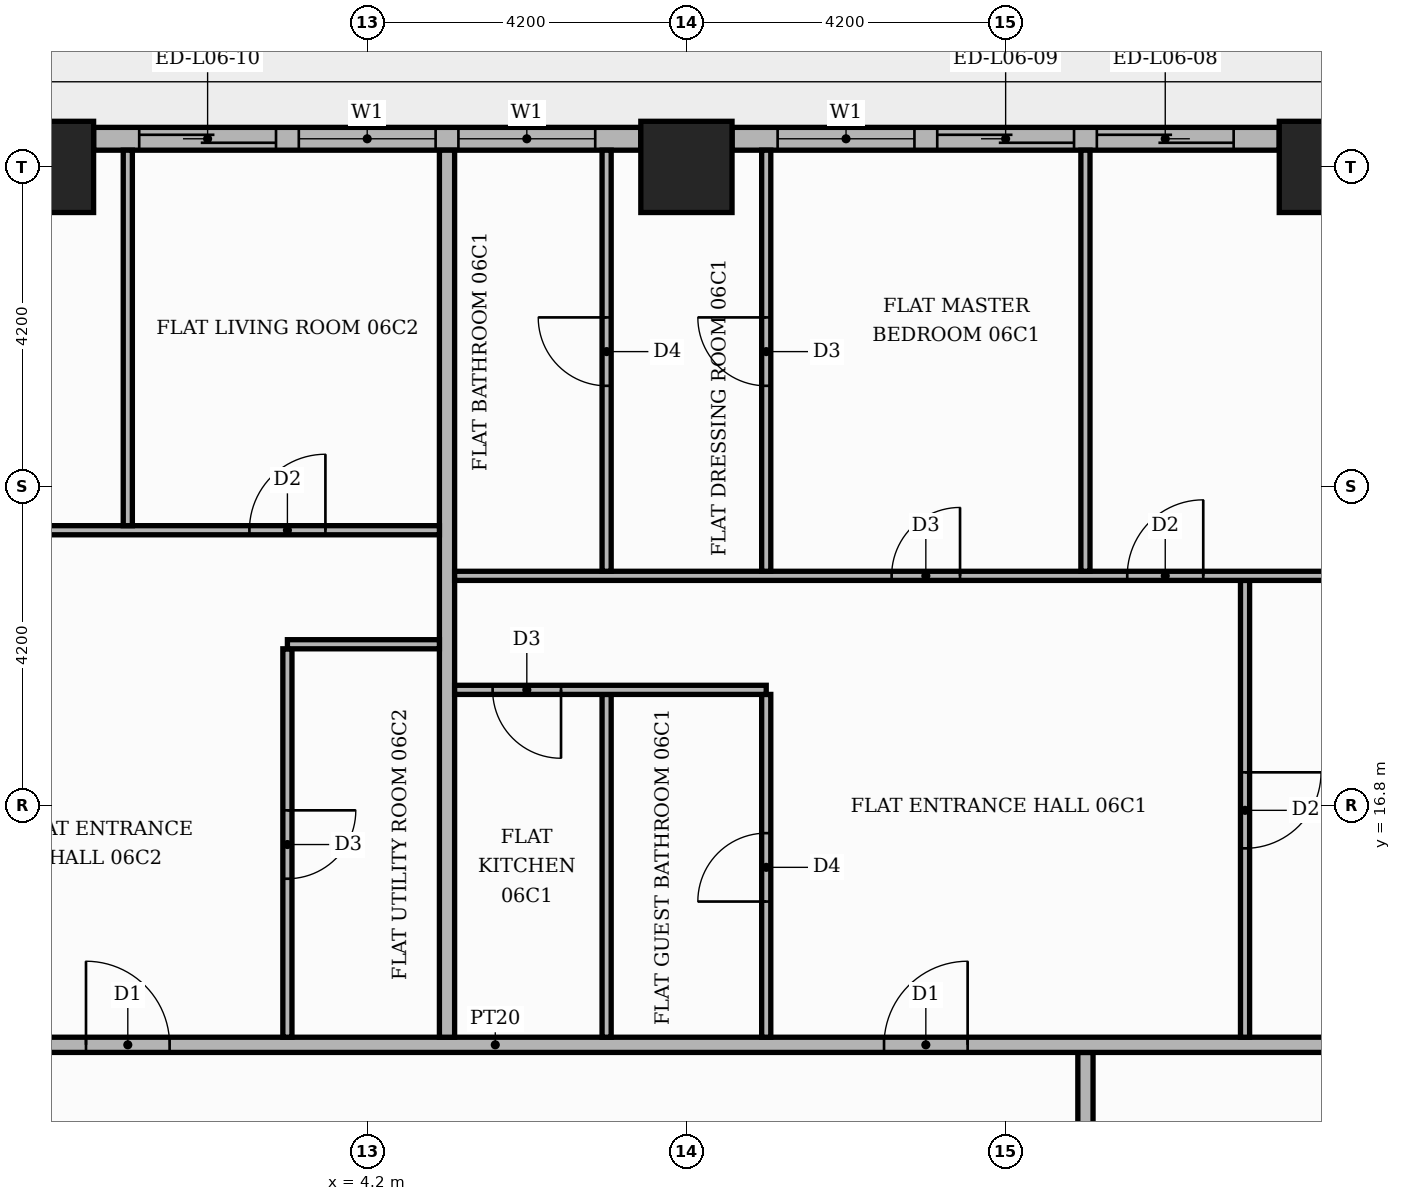
"""IFC4 building model, lengths in metres.
Left out: names, types, materials, properties, quantities, classifications, styles, units other than length and angle.
Written with IfcOpenShell. Run it as: python <this file> out.ifc"""

import sys

from ifc_helpers import new_model, si_unit, direction, frame, frame_2d, origin, origin_2d, place, context, subcontext, project, spatial, rectangle, extrude, element, fill, save


model = new_model("IFC4")
c1 = context("Model", 3, precision=1e-05, world=origin(), true_north=direction((0.0, 1.0)))
c2 = subcontext(c1, "Body", "Model", "MODEL_VIEW")
j1 = project(units=[si_unit("LENGTHUNIT", "METRE"), si_unit("PLANEANGLEUNIT", "RADIAN")], contexts=[c1])
p1 = place(None, origin())
s1 = spatial("IfcSite", under=j1, at=p1, CompositionType="ELEMENT")
p2 = place(p1, origin())
s2 = spatial("IfcBuilding", under=s1, at=p2, CompositionType="ELEMENT")
p3 = place(p2, frame((0.0, 0.0, 30.9)))
s3 = spatial("IfcBuildingStorey", under=s2, at=p3, CompositionType="ELEMENT", Elevation=30.9)
for number, where, z_axis, x_axis in (
    (1, (0.0, 25.2, 0.0), (0.0, 0.0, 1.0), (1.0, 0.0, 0.0)),
    (2, (8.4, 25.2, 0.0), (0.0, 0.0, 1.0), (1.0, 0.0, 0.0)),
    (3, (16.8, 25.2, 0.0), (0.0, 0.0, 1.0), (1.0, 0.0, 0.0)),
):
    element("IfcColumn", number, at=place(p3, frame(where, z_axis=z_axis, x_axis=x_axis)), inside=s3, PredefinedType="COLUMN", context=c2, shape_type="SweptSolid", body=[
        extrude(rectangle(XDim=1.2, YDim=1.2, at=origin_2d()), origin(), (0.0, 0.0, 1.0), 3.9),
    ])
p4 = place(p3, frame((16.2, 25.57, 0.0), z_axis=(0.0, 0.0, 1.0), x_axis=(-1.0, 0.0, 0.0)))
e4 = element("IfcWall", 4, at=p4, inside=s3, PredefinedType="STANDARD", context=c2, shape_type="SweptSolid", body=[
    extrude(rectangle(XDim=7.2, YDim=0.3, at=frame_2d((3.6, 0.0))), origin(), (0.0, 0.0, 1.0), 3.48),
])
p5 = place(p4, frame((0.6, 0.0, 0.0)))
e5 = element("IfcOpeningElement", 5, at=p5, cuts=e4, PredefinedType="OPENING", context=c2, shape_type="SweptSolid", body=[
    extrude(rectangle(XDim=1.8, YDim=2.4, at=frame_2d((0.9, 1.2))), frame((0.0, 0.16, 0.0), z_axis=(0.0, -1.0, 0.0), x_axis=(1.0, 0.0, 0.0)), (0.0, 0.0, 1.0), 0.32),
])
p6 = place(p4, frame((2.7, 0.0, 0.0)))
e6 = element("IfcOpeningElement", 6, at=p6, cuts=e4, PredefinedType="OPENING", context=c2, shape_type="SweptSolid", body=[
    extrude(rectangle(XDim=1.8, YDim=2.4, at=frame_2d((0.9, 1.2))), frame((0.0, 0.16, 0.0), z_axis=(0.0, -1.0, 0.0), x_axis=(1.0, 0.0, 0.0)), (0.0, 0.0, 1.0), 0.32),
])
p7 = place(p4, frame((4.8, 0.0, 0.9)))
e7 = element("IfcOpeningElement", 7, at=p7, cuts=e4, PredefinedType="OPENING", context=c2, shape_type="SweptSolid", body=[
    extrude(rectangle(XDim=1.8, YDim=2.1, at=frame_2d((0.9, 1.05))), frame((0.0, 0.16, 0.0), z_axis=(0.0, -1.0, 0.0), x_axis=(1.0, 0.0, 0.0)), (0.0, 0.0, 1.0), 0.32),
])
p8 = place(p3, frame((7.8, 25.57, 0.0), z_axis=(0.0, 0.0, 1.0), x_axis=(-1.0, 0.0, 0.0)))
e8 = element("IfcWall", 8, at=p8, inside=s3, PredefinedType="STANDARD", context=c2, shape_type="SweptSolid", body=[
    extrude(rectangle(XDim=7.2, YDim=0.3, at=frame_2d((3.6, 0.0))), origin(), (0.0, 0.0, 1.0), 3.48),
])
p9 = place(p8, frame((0.6, 0.0, 0.9)))
e9 = element("IfcOpeningElement", 9, at=p9, cuts=e8, PredefinedType="OPENING", context=c2, shape_type="SweptSolid", body=[
    extrude(rectangle(XDim=1.8, YDim=2.1, at=frame_2d((0.9, 1.05))), frame((0.0, 0.16, 0.0), z_axis=(0.0, -1.0, 0.0), x_axis=(1.0, 0.0, 0.0)), (0.0, 0.0, 1.0), 0.32),
])
p10 = place(p8, frame((2.7, 0.0, 0.9)))
e10 = element("IfcOpeningElement", 10, at=p10, cuts=e8, PredefinedType="OPENING", context=c2, shape_type="SweptSolid", body=[
    extrude(rectangle(XDim=1.8, YDim=2.1, at=frame_2d((0.9, 1.05))), frame((0.0, 0.16, 0.0), z_axis=(0.0, -1.0, 0.0), x_axis=(1.0, 0.0, 0.0)), (0.0, 0.0, 1.0), 0.32),
])
p11 = place(p8, frame((4.8, 0.0, 0.0)))
e11 = element("IfcOpeningElement", 11, at=p11, cuts=e8, PredefinedType="OPENING", context=c2, shape_type="SweptSolid", body=[
    extrude(rectangle(XDim=1.8, YDim=2.4, at=frame_2d((0.9, 1.2))), frame((0.0, 0.16, 0.0), z_axis=(0.0, -1.0, 0.0), x_axis=(1.0, 0.0, 0.0)), (0.0, 0.0, 1.0), 0.32),
])
p12 = place(p3, frame((13.65, -5.15, 0.0), z_axis=(0.0, 0.0, 1.0), x_axis=(0.0, 1.0, 0.0)))
e12 = element("IfcWall", 12, at=p12, inside=s3, PredefinedType="PARTITIONING", context=c2, shape_type="SweptSolid", body=[
    extrude(rectangle(XDim=18.7, YDim=0.2, at=frame_2d((9.35, 0.0))), origin(), (0.0, 0.0, 1.0), 3.48),
])
p13 = place(p12, frame((3.55, 0.0, 0.0)))
e13 = element("IfcOpeningElement", 13, at=p13, cuts=e12, PredefinedType="OPENING", context=c2, shape_type="SweptSolid", body=[
    extrude(rectangle(XDim=1.1, YDim=2.4, at=frame_2d((0.55, 1.2))), frame((0.0, 0.11, 0.0), z_axis=(0.0, -1.0, 0.0), x_axis=(1.0, 0.0, 0.0)), (0.0, 0.0, 1.0), 0.22),
])
p14 = place(p3, frame((-13.65, 13.65, 0.0), z_axis=(0.0, 0.0, 1.0), x_axis=(1.0, 0.0, 0.0)))
e14 = element("IfcWall", 14, at=p14, inside=s3, PredefinedType="PARTITIONING", context=c2, shape_type="SweptSolid", body=[
    extrude(rectangle(XDim=39.07, YDim=0.2, at=frame_2d((19.535, 0.0))), origin(), (0.0, 0.0, 1.0), 3.48),
])
p15 = place(p14, frame((24.65, 0.0, 0.0)))
e15 = element("IfcOpeningElement", 15, at=p15, cuts=e14, PredefinedType="OPENING", context=c2, shape_type="SweptSolid", body=[
    extrude(rectangle(XDim=1.1, YDim=2.4, at=frame_2d((0.55, 1.2))), frame((0.0, 0.11, 0.0), z_axis=(0.0, -1.0, 0.0), x_axis=(1.0, 0.0, 0.0)), (0.0, 0.0, 1.0), 0.22),
])
p16 = place(p14, frame((14.15, 0.0, 0.0)))
e16 = element("IfcOpeningElement", 16, at=p16, cuts=e14, PredefinedType="OPENING", context=c2, shape_type="SweptSolid", body=[
    extrude(rectangle(XDim=1.1, YDim=2.4, at=frame_2d((0.55, 1.2))), frame((0.0, 0.11, 0.0), z_axis=(0.0, -1.0, 0.0), x_axis=(1.0, 0.0, 0.0)), (0.0, 0.0, 1.0), 0.22),
])
p17 = place(p3, frame((3.15, 13.75, 0.0), z_axis=(0.0, 0.0, 1.0), x_axis=(0.0, 1.0, 0.0)))
e17 = element("IfcWall", 17, at=p17, inside=s3, PredefinedType="PARTITIONING", context=c2, shape_type="SweptSolid", body=[
    extrude(rectangle(XDim=5.11, YDim=0.12, at=frame_2d((2.555, 0.0))), origin(), (0.0, 0.0, 1.0), 3.48),
])
p18 = place(p17, frame((2.085, 0.0, 0.0)))
e18 = element("IfcOpeningElement", 18, at=p18, cuts=e17, PredefinedType="OPENING", context=c2, shape_type="SweptSolid", body=[
    extrude(rectangle(XDim=0.9, YDim=2.1, at=frame_2d((0.45, 1.05))), frame((0.0, 0.07, 0.0), z_axis=(0.0, -1.0, 0.0), x_axis=(1.0, 0.0, 0.0)), (0.0, 0.0, 1.0), 0.14),
])
p19 = place(p3, frame((5.25, 13.75, 0.0), z_axis=(0.0, 0.0, 1.0), x_axis=(0.0, 1.0, 0.0)))
e19 = element("IfcWall", 19, at=p19, inside=s3, PredefinedType="PARTITIONING", context=c2, shape_type="SweptSolid", body=[
    extrude(rectangle(XDim=11.67, YDim=0.2, at=frame_2d((5.835, 0.0))), origin(), (0.0, 0.0, 1.0), 3.48),
])
p20 = place(p3, frame((7.35, 13.75, 0.0), z_axis=(0.0, 0.0, 1.0), x_axis=(0.0, 1.0, 0.0)))
e20 = element("IfcWall", 20, at=p20, inside=s3, PredefinedType="PARTITIONING", context=c2, shape_type="SweptSolid", body=[
    extrude(rectangle(XDim=4.51, YDim=0.12, at=frame_2d((2.255, 0.0))), origin(), (0.0, 0.0, 1.0), 3.48),
])
p21 = place(p3, frame((9.45, 13.75, 0.0), z_axis=(0.0, 0.0, 1.0), x_axis=(0.0, 1.0, 0.0)))
e21 = element("IfcWall", 21, at=p21, inside=s3, PredefinedType="PARTITIONING", context=c2, shape_type="SweptSolid", body=[
    extrude(rectangle(XDim=4.51, YDim=0.12, at=frame_2d((2.255, 0.0))), origin(), (0.0, 0.0, 1.0), 3.48),
])
p22 = place(p21, frame((1.785, 0.0, 0.0)))
e22 = element("IfcOpeningElement", 22, at=p22, cuts=e21, PredefinedType="OPENING", context=c2, shape_type="SweptSolid", body=[
    extrude(rectangle(XDim=0.9, YDim=2.1, at=frame_2d((0.45, 1.05))), frame((0.0, 0.07, 0.0), z_axis=(0.0, -1.0, 0.0), x_axis=(1.0, 0.0, 0.0)), (0.0, 0.0, 1.0), 0.14),
])
p23 = place(p3, frame((15.75, 13.75, 0.0), z_axis=(0.0, 0.0, 1.0), x_axis=(0.0, 1.0, 0.0)))
e23 = element("IfcWall", 23, at=p23, inside=s3, PredefinedType="PARTITIONING", context=c2, shape_type="SweptSolid", body=[
    extrude(rectangle(XDim=6.01, YDim=0.12, at=frame_2d((3.005, 0.0))), origin(), (0.0, 0.0, 1.0), 3.48),
])
p24 = place(p23, frame((2.485, 0.0, 0.0)))
e24 = element("IfcOpeningElement", 24, at=p24, cuts=e23, PredefinedType="OPENING", context=c2, shape_type="SweptSolid", body=[
    extrude(rectangle(XDim=1.0, YDim=2.1, at=frame_2d((0.5, 1.05))), frame((0.0, 0.07, 0.0), z_axis=(0.0, -1.0, 0.0), x_axis=(1.0, 0.0, 0.0)), (0.0, 0.0, 1.0), 0.14),
])
p25 = place(p3, frame((5.35, 18.32, 0.0), z_axis=(0.0, 0.0, 1.0), x_axis=(1.0, 0.0, 0.0)))
e25 = element("IfcWall", 25, at=p25, inside=s3, PredefinedType="PARTITIONING", context=c2, shape_type="SweptSolid", body=[
    extrude(rectangle(XDim=4.1, YDim=0.12, at=frame_2d((2.05, 0.0))), origin(), (0.0, 0.0, 1.0), 3.48),
])
p26 = place(p25, frame((0.5, 0.0, 0.0)))
e26 = element("IfcOpeningElement", 26, at=p26, cuts=e25, PredefinedType="OPENING", context=c2, shape_type="SweptSolid", body=[
    extrude(rectangle(XDim=0.9, YDim=2.1, at=frame_2d((0.45, 1.05))), frame((0.0, 0.07, 0.0), z_axis=(0.0, -1.0, 0.0), x_axis=(1.0, 0.0, 0.0)), (0.0, 0.0, 1.0), 0.14),
])
p27 = place(p3, frame((3.15, 18.92, 0.0), z_axis=(0.0, 0.0, 1.0), x_axis=(1.0, 0.0, 0.0)))
e27 = element("IfcWall", 27, at=p27, inside=s3, PredefinedType="PARTITIONING", context=c2, shape_type="SweptSolid", body=[
    extrude(rectangle(XDim=2.0, YDim=0.12, at=frame_2d((1.0, 0.0))), origin(), (0.0, 0.0, 1.0), 3.48),
])
p28 = place(p3, frame((5.35, 19.82, 0.0), z_axis=(0.0, 0.0, 1.0), x_axis=(1.0, 0.0, 0.0)))
e28 = element("IfcWall", 28, at=p28, inside=s3, PredefinedType="PARTITIONING", context=c2, shape_type="SweptSolid", body=[
    extrude(rectangle(XDim=11.95, YDim=0.12, at=frame_2d((5.975, 0.0))), origin(), (0.0, 0.0, 1.0), 3.48),
])
p29 = place(p28, frame((8.85, 0.0, 0.0)))
e29 = element("IfcOpeningElement", 29, at=p29, cuts=e28, PredefinedType="OPENING", context=c2, shape_type="SweptSolid", body=[
    extrude(rectangle(XDim=1.0, YDim=2.1, at=frame_2d((0.5, 1.05))), frame((0.0, 0.07, 0.0), z_axis=(0.0, -1.0, 0.0), x_axis=(1.0, 0.0, 0.0)), (0.0, 0.0, 1.0), 0.14),
])
p30 = place(p28, frame((5.75, 0.0, 0.0)))
e30 = element("IfcOpeningElement", 30, at=p30, cuts=e28, PredefinedType="OPENING", context=c2, shape_type="SweptSolid", body=[
    extrude(rectangle(XDim=0.9, YDim=2.1, at=frame_2d((0.45, 1.05))), frame((0.0, 0.07, 0.0), z_axis=(0.0, -1.0, 0.0), x_axis=(1.0, 0.0, 0.0)), (0.0, 0.0, 1.0), 0.14),
])
p31 = place(p3, frame((7.35, 19.88, 0.0), z_axis=(0.0, 0.0, 1.0), x_axis=(0.0, 1.0, 0.0)))
e31 = element("IfcWall", 31, at=p31, inside=s3, PredefinedType="PARTITIONING", context=c2, shape_type="SweptSolid", body=[
    extrude(rectangle(XDim=5.54, YDim=0.12, at=frame_2d((2.77, 0.0))), origin(), (0.0, 0.0, 1.0), 3.48),
])
p32 = place(p31, frame((2.44, 0.0, 0.0)))
e32 = element("IfcOpeningElement", 32, at=p32, cuts=e31, PredefinedType="OPENING", context=c2, shape_type="SweptSolid", body=[
    extrude(rectangle(XDim=0.9, YDim=2.1, at=frame_2d((0.45, 1.05))), frame((0.0, 0.07, 0.0), z_axis=(0.0, -1.0, 0.0), x_axis=(1.0, 0.0, 0.0)), (0.0, 0.0, 1.0), 0.14),
])
p33 = place(p3, frame((9.45, 19.88, 0.0), z_axis=(0.0, 0.0, 1.0), x_axis=(0.0, 1.0, 0.0)))
e33 = element("IfcWall", 33, at=p33, inside=s3, PredefinedType="PARTITIONING", context=c2, shape_type="SweptSolid", body=[
    extrude(rectangle(XDim=5.54, YDim=0.12, at=frame_2d((2.77, 0.0))), origin(), (0.0, 0.0, 1.0), 3.48),
])
p34 = place(p33, frame((2.44, 0.0, 0.0)))
e34 = element("IfcOpeningElement", 34, at=p34, cuts=e33, PredefinedType="OPENING", context=c2, shape_type="SweptSolid", body=[
    extrude(rectangle(XDim=0.9, YDim=2.1, at=frame_2d((0.45, 1.05))), frame((0.0, 0.07, 0.0), z_axis=(0.0, -1.0, 0.0), x_axis=(1.0, 0.0, 0.0)), (0.0, 0.0, 1.0), 0.14),
])
p35 = place(p3, frame((13.65, 19.88, 0.0), z_axis=(0.0, 0.0, 1.0), x_axis=(0.0, 1.0, 0.0)))
e35 = element("IfcWall", 35, at=p35, inside=s3, PredefinedType="PARTITIONING", context=c2, shape_type="SweptSolid", body=[
    extrude(rectangle(XDim=5.54, YDim=0.12, at=frame_2d((2.77, 0.0))), origin(), (0.0, 0.0, 1.0), 3.48),
])
p36 = place(p3, frame((-13.55, 20.42, 0.0), z_axis=(0.0, 0.0, 1.0), x_axis=(1.0, 0.0, 0.0)))
e36 = element("IfcWall", 36, at=p36, inside=s3, PredefinedType="PARTITIONING", context=c2, shape_type="SweptSolid", body=[
    extrude(rectangle(XDim=18.7, YDim=0.12, at=frame_2d((9.35, 0.0))), origin(), (0.0, 0.0, 1.0), 3.48),
])
p37 = place(p36, frame((16.2, 0.0, 0.0)))
e37 = element("IfcOpeningElement", 37, at=p37, cuts=e36, PredefinedType="OPENING", context=c2, shape_type="SweptSolid", body=[
    extrude(rectangle(XDim=1.0, YDim=2.1, at=frame_2d((0.5, 1.05))), frame((0.0, 0.07, 0.0), z_axis=(0.0, -1.0, 0.0), x_axis=(1.0, 0.0, 0.0)), (0.0, 0.0, 1.0), 0.14),
])
p38 = place(p36, frame((12.05, 0.0, 0.0)))
e38 = element("IfcOpeningElement", 38, at=p38, cuts=e36, PredefinedType="OPENING", context=c2, shape_type="SweptSolid", body=[
    extrude(rectangle(XDim=0.9, YDim=2.1, at=frame_2d((0.45, 1.05))), frame((0.0, 0.07, 0.0), z_axis=(0.0, -1.0, 0.0), x_axis=(1.0, 0.0, 0.0)), (0.0, 0.0, 1.0), 0.14),
])
p39 = place(p36, frame((3.65, 0.0, 0.0)))
e39 = element("IfcOpeningElement", 39, at=p39, cuts=e36, PredefinedType="OPENING", context=c2, shape_type="SweptSolid", body=[
    extrude(rectangle(XDim=0.9, YDim=2.1, at=frame_2d((0.45, 1.05))), frame((0.0, 0.07, 0.0), z_axis=(0.0, -1.0, 0.0), x_axis=(1.0, 0.0, 0.0)), (0.0, 0.0, 1.0), 0.14),
])
p40 = place(p3, frame((1.05, 20.48, 0.0), z_axis=(0.0, 0.0, 1.0), x_axis=(0.0, 1.0, 0.0)))
e40 = element("IfcWall", 40, at=p40, inside=s3, PredefinedType="PARTITIONING", context=c2, shape_type="SweptSolid", body=[
    extrude(rectangle(XDim=4.94, YDim=0.12, at=frame_2d((2.47, 0.0))), origin(), (0.0, 0.0, 1.0), 3.48),
])
p41 = place(p5, origin())
e41 = element("IfcDoor", 41, at=p41, inside=s3, OperationType="SLIDING_TO_LEFT", PredefinedType="DOOR", context=c2, shape_type="SweptSolid", body=[
    extrude(rectangle(XDim=1.8, YDim=2.4, at=frame_2d((0.9, 1.2))), frame((0.0, 0.025, 0.0), z_axis=(0.0, -1.0, 0.0), x_axis=(1.0, 0.0, 0.0)), (0.0, 0.0, 1.0), 0.05),
])
fill(e5, e41)
p42 = place(p6, origin())
e42 = element("IfcDoor", 42, at=p42, inside=s3, OperationType="SLIDING_TO_RIGHT", PredefinedType="DOOR", context=c2, shape_type="SweptSolid", body=[
    extrude(rectangle(XDim=1.8, YDim=2.4, at=frame_2d((0.9, 1.2))), frame((0.0, 0.025, 0.0), z_axis=(0.0, -1.0, 0.0), x_axis=(1.0, 0.0, 0.0)), (0.0, 0.0, 1.0), 0.05),
])
fill(e6, e42)
p43 = place(p7, origin())
e43 = element("IfcWindow", 43, at=p43, inside=s3, PartitioningType="SINGLE_PANEL", PredefinedType="WINDOW", context=c2, shape_type="SweptSolid", body=[
    extrude(rectangle(XDim=1.8, YDim=2.1, at=frame_2d((0.9, 1.05))), frame((0.0, 0.03, 0.0), z_axis=(0.0, -1.0, 0.0), x_axis=(1.0, 0.0, 0.0)), (0.0, 0.0, 1.0), 0.06),
])
fill(e7, e43)
p44 = place(p9, origin())
e44 = element("IfcWindow", 44, at=p44, inside=s3, PartitioningType="SINGLE_PANEL", PredefinedType="WINDOW", context=c2, shape_type="SweptSolid", body=[
    extrude(rectangle(XDim=1.8, YDim=2.1, at=frame_2d((0.9, 1.05))), frame((0.0, 0.03, 0.0), z_axis=(0.0, -1.0, 0.0), x_axis=(1.0, 0.0, 0.0)), (0.0, 0.0, 1.0), 0.06),
])
fill(e9, e44)
p45 = place(p10, origin())
e45 = element("IfcWindow", 45, at=p45, inside=s3, PartitioningType="SINGLE_PANEL", PredefinedType="WINDOW", context=c2, shape_type="SweptSolid", body=[
    extrude(rectangle(XDim=1.8, YDim=2.1, at=frame_2d((0.9, 1.05))), frame((0.0, 0.03, 0.0), z_axis=(0.0, -1.0, 0.0), x_axis=(1.0, 0.0, 0.0)), (0.0, 0.0, 1.0), 0.06),
])
fill(e10, e45)
p46 = place(p11, origin())
e46 = element("IfcDoor", 46, at=p46, inside=s3, OperationType="SLIDING_TO_RIGHT", PredefinedType="DOOR", context=c2, shape_type="SweptSolid", body=[
    extrude(rectangle(XDim=1.8, YDim=2.4, at=frame_2d((0.9, 1.2))), frame((0.0, 0.025, 0.0), z_axis=(0.0, -1.0, 0.0), x_axis=(1.0, 0.0, 0.0)), (0.0, 0.0, 1.0), 0.05),
])
fill(e11, e46)
p47 = place(p15, origin())
e47 = element("IfcDoor", 47, at=p47, inside=s3, OperationType="SINGLE_SWING_RIGHT", PredefinedType="DOOR", context=c2, shape_type="SweptSolid", body=[
    extrude(rectangle(XDim=1.1, YDim=2.4, at=frame_2d((0.55, 1.2))), frame((0.0, 0.025, 0.0), z_axis=(0.0, -1.0, 0.0), x_axis=(1.0, 0.0, 0.0)), (0.0, 0.0, 1.0), 0.05),
])
fill(e15, e47)
p48 = place(p24, frame((1.0, 0.0, 0.0), z_axis=(0.0, 0.0, 1.0), x_axis=(-1.0, 0.0, 0.0)))
e48 = element("IfcDoor", 48, at=p48, inside=s3, OperationType="SINGLE_SWING_RIGHT", PredefinedType="DOOR", context=c2, shape_type="SweptSolid", body=[
    extrude(rectangle(XDim=1.0, YDim=2.1, at=frame_2d((0.5, 1.05))), frame((0.0, 0.025, 0.0), z_axis=(0.0, -1.0, 0.0), x_axis=(1.0, 0.0, 0.0)), (0.0, 0.0, 1.0), 0.05),
])
fill(e24, e48)
p49 = place(p22, origin())
e49 = element("IfcDoor", 49, at=p49, inside=s3, OperationType="SINGLE_SWING_LEFT", PredefinedType="DOOR", context=c2, shape_type="SweptSolid", body=[
    extrude(rectangle(XDim=0.9, YDim=2.1, at=frame_2d((0.45, 1.05))), frame((0.0, 0.025, 0.0), z_axis=(0.0, -1.0, 0.0), x_axis=(1.0, 0.0, 0.0)), (0.0, 0.0, 1.0), 0.05),
])
fill(e22, e49)
p50 = place(p26, frame((0.9, 0.0, 0.0), z_axis=(0.0, 0.0, 1.0), x_axis=(-1.0, 0.0, 0.0)))
e50 = element("IfcDoor", 50, at=p50, inside=s3, OperationType="SINGLE_SWING_RIGHT", PredefinedType="DOOR", context=c2, shape_type="SweptSolid", body=[
    extrude(rectangle(XDim=0.9, YDim=2.1, at=frame_2d((0.45, 1.05))), frame((0.0, 0.025, 0.0), z_axis=(0.0, -1.0, 0.0), x_axis=(1.0, 0.0, 0.0)), (0.0, 0.0, 1.0), 0.05),
])
fill(e26, e50)
p51 = place(p29, origin())
e51 = element("IfcDoor", 51, at=p51, inside=s3, OperationType="SINGLE_SWING_RIGHT", PredefinedType="DOOR", context=c2, shape_type="SweptSolid", body=[
    extrude(rectangle(XDim=1.0, YDim=2.1, at=frame_2d((0.5, 1.05))), frame((0.0, 0.025, 0.0), z_axis=(0.0, -1.0, 0.0), x_axis=(1.0, 0.0, 0.0)), (0.0, 0.0, 1.0), 0.05),
])
fill(e29, e51)
p52 = place(p30, origin())
e52 = element("IfcDoor", 52, at=p52, inside=s3, OperationType="SINGLE_SWING_RIGHT", PredefinedType="DOOR", context=c2, shape_type="SweptSolid", body=[
    extrude(rectangle(XDim=0.9, YDim=2.1, at=frame_2d((0.45, 1.05))), frame((0.0, 0.025, 0.0), z_axis=(0.0, -1.0, 0.0), x_axis=(1.0, 0.0, 0.0)), (0.0, 0.0, 1.0), 0.05),
])
fill(e30, e52)
p53 = place(p34, origin())
e53 = element("IfcDoor", 53, at=p53, inside=s3, OperationType="SINGLE_SWING_RIGHT", PredefinedType="DOOR", context=c2, shape_type="SweptSolid", body=[
    extrude(rectangle(XDim=0.9, YDim=2.1, at=frame_2d((0.45, 1.05))), frame((0.0, 0.025, 0.0), z_axis=(0.0, -1.0, 0.0), x_axis=(1.0, 0.0, 0.0)), (0.0, 0.0, 1.0), 0.05),
])
fill(e34, e53)
p54 = place(p32, origin())
e54 = element("IfcDoor", 54, at=p54, inside=s3, OperationType="SINGLE_SWING_RIGHT", PredefinedType="DOOR", context=c2, shape_type="SweptSolid", body=[
    extrude(rectangle(XDim=0.9, YDim=2.1, at=frame_2d((0.45, 1.05))), frame((0.0, 0.025, 0.0), z_axis=(0.0, -1.0, 0.0), x_axis=(1.0, 0.0, 0.0)), (0.0, 0.0, 1.0), 0.05),
])
fill(e32, e54)
p55 = place(p16, origin())
e55 = element("IfcDoor", 55, at=p55, inside=s3, OperationType="SINGLE_SWING_LEFT", PredefinedType="DOOR", context=c2, shape_type="SweptSolid", body=[
    extrude(rectangle(XDim=1.1, YDim=2.4, at=frame_2d((0.55, 1.2))), frame((0.0, 0.025, 0.0), z_axis=(0.0, -1.0, 0.0), x_axis=(1.0, 0.0, 0.0)), (0.0, 0.0, 1.0), 0.05),
])
fill(e16, e55)
p56 = place(p18, frame((0.9, 0.0, 0.0), z_axis=(0.0, 0.0, 1.0), x_axis=(-1.0, 0.0, 0.0)))
e56 = element("IfcDoor", 56, at=p56, inside=s3, OperationType="SINGLE_SWING_RIGHT", PredefinedType="DOOR", context=c2, shape_type="SweptSolid", body=[
    extrude(rectangle(XDim=0.9, YDim=2.1, at=frame_2d((0.45, 1.05))), frame((0.0, 0.025, 0.0), z_axis=(0.0, -1.0, 0.0), x_axis=(1.0, 0.0, 0.0)), (0.0, 0.0, 1.0), 0.05),
])
fill(e18, e56)
p57 = place(p37, origin())
e57 = element("IfcDoor", 57, at=p57, inside=s3, OperationType="SINGLE_SWING_RIGHT", PredefinedType="DOOR", context=c2, shape_type="SweptSolid", body=[
    extrude(rectangle(XDim=1.0, YDim=2.1, at=frame_2d((0.5, 1.05))), frame((0.0, 0.025, 0.0), z_axis=(0.0, -1.0, 0.0), x_axis=(1.0, 0.0, 0.0)), (0.0, 0.0, 1.0), 0.05),
])
fill(e37, e57)
save(model, sys.argv[1])
